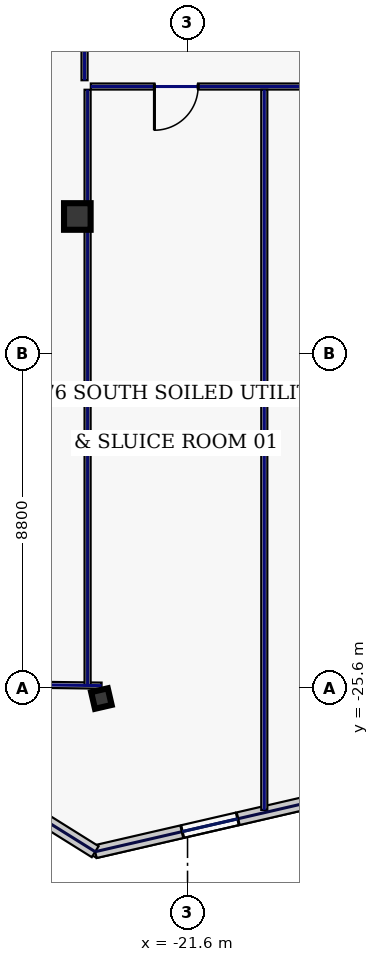
"""IFC4 building model, lengths in metres.
Left out: names, types, materials, properties, quantities, classifications, styles, units other than length and angle.
Written with IfcOpenShell. Run it as: python <this file> out.ifc"""

import sys

from ifc_helpers import new_model, si_unit, direction, frame, frame_2d, origin, origin_2d, place, context, subcontext, project, spatial, rectangle, hollow_rectangle, extrude, element, fill, save


model = new_model("IFC4")
c1 = context("Model", 3, precision=1e-05, world=origin(), true_north=direction((0.0, 1.0)))
c2 = subcontext(c1, "Body", "Model", "MODEL_VIEW")
j1 = project(units=[si_unit("LENGTHUNIT", "METRE"), si_unit("PLANEANGLEUNIT", "RADIAN")], contexts=[c1])
p1 = place(None, origin())
s1 = spatial("IfcSite", under=j1, at=p1, CompositionType="ELEMENT")
p2 = place(p1, origin())
s2 = spatial("IfcBuilding", under=s1, at=p2, CompositionType="ELEMENT")
p3 = place(p2, frame((0.0, 0.0, 325.0)))
s3 = spatial("IfcBuildingStorey", under=s2, at=p3, CompositionType="ELEMENT", Elevation=325.0)
p4 = place(p3, frame((-24.5, -13.2, 0.0), z_axis=(0.0, 0.0, 1.0), x_axis=(1.0, 0.0, 0.0)))
e1 = element("IfcColumn", 1, at=p4, inside=s3, PredefinedType="COLUMN", context=c2, shape_type="SweptSolid", body=[
    extrude(hollow_rectangle(XDim=0.7, YDim=0.7, WallThickness=0.032, at=origin_2d()), origin(), (0.0, 0.0, 1.0), 3.74),
])
p5 = place(p3, frame((-23.867, -25.886, 0.0), z_axis=(0.0, 0.0, 1.0), x_axis=(0.974370064785, 0.224951054344, 0.0)))
e2 = element("IfcColumn", 2, at=p5, inside=s3, PredefinedType="COLUMN", context=c2, shape_type="SweptSolid", body=[
    extrude(hollow_rectangle(XDim=0.45, YDim=0.45, WallThickness=0.022, at=origin_2d()), origin(), (0.0, 0.0, 1.0), 3.74),
])
p6 = place(p3, frame((-24.03, -29.916, 0.0), z_axis=(0.0, 0.0, 1.0), x_axis=(0.974370978061, 0.224947098473, 0.0)))
e3 = element("IfcWall", 3, at=p6, inside=s3, PredefinedType="STANDARD", context=c2, shape_type="SweptSolid", body=[
    extrude(rectangle(XDim=17.506, YDim=0.34, at=frame_2d((8.753, 0.0))), origin(), (0.0, 0.0, 1.0), 3.74),
])
p7 = place(p6, frame((2.35, 0.0, 0.9)))
e4 = element("IfcOpeningElement", 4, at=p7, cuts=e3, PredefinedType="OPENING", context=c2, shape_type="SweptSolid", body=[
    extrude(rectangle(XDim=1.5, YDim=2.0, at=frame_2d((0.75, 1.0))), frame((0.0, 0.18, 0.0), z_axis=(0.0, -1.0, 0.0), x_axis=(1.0, 0.0, 0.0)), (0.0, 0.0, 1.0), 0.36),
])
p8 = place(p6, frame((5.817, 0.0, 0.9)))
e5 = element("IfcOpeningElement", 5, at=p8, cuts=e3, PredefinedType="OPENING", context=c2, shape_type="SweptSolid", body=[
    extrude(rectangle(XDim=1.5, YDim=2.0, at=frame_2d((0.75, 1.0))), frame((0.0, 0.18, 0.0), z_axis=(0.0, -1.0, 0.0), x_axis=(1.0, 0.0, 0.0)), (0.0, 0.0, 1.0), 0.36),
])
p9 = place(p6, frame((9.886, 0.0, 0.9)))
e6 = element("IfcOpeningElement", 6, at=p9, cuts=e3, PredefinedType="OPENING", context=c2, shape_type="SweptSolid", body=[
    extrude(rectangle(XDim=1.5, YDim=2.0, at=frame_2d((0.75, 1.0))), frame((0.0, 0.18, 0.0), z_axis=(0.0, -1.0, 0.0), x_axis=(1.0, 0.0, 0.0)), (0.0, 0.0, 1.0), 0.36),
])
p10 = place(p6, frame((13.353, 0.0, 0.9)))
e7 = element("IfcOpeningElement", 7, at=p10, cuts=e3, PredefinedType="OPENING", context=c2, shape_type="SweptSolid", body=[
    extrude(rectangle(XDim=1.5, YDim=2.0, at=frame_2d((0.75, 1.0))), frame((0.0, 0.18, 0.0), z_axis=(0.0, -1.0, 0.0), x_axis=(1.0, 0.0, 0.0)), (0.0, 0.0, 1.0), 0.36),
])
p11 = place(p3, frame((-29.343, -26.596, 0.0), z_axis=(0.0, 0.0, 1.0), x_axis=(0.848037708252, -0.529935887993, 0.0)))
e8 = element("IfcWall", 8, at=p11, inside=s3, PredefinedType="STANDARD", context=c2, shape_type="SweptSolid", body=[
    extrude(rectangle(XDim=6.265, YDim=0.34, at=frame_2d((3.133, 0.0))), origin(), (0.0, 0.0, 1.0), 3.74),
])
p12 = place(p3, frame((-28.994, -25.479, 0.0), z_axis=(0.0, 0.0, 1.0), x_axis=(0.999915052546, -0.01303409726, 0.0)))
e9 = element("IfcWall", 9, at=p12, inside=s3, PredefinedType="PARTITIONING", context=c2, shape_type="SweptSolid", body=[
    extrude(rectangle(XDim=5.132, YDim=0.16, at=frame_2d((2.566, 0.0))), origin(), (0.0, 0.0, 1.0), 3.74),
])
p13 = place(p3, frame((-24.31, -9.615, 0.0), z_axis=(0.0, 0.0, 1.0), x_axis=(0.0, 1.0, 0.0)))
e10 = element("IfcWall", 10, at=p13, inside=s3, PredefinedType="PARTITIONING", context=c2, shape_type="SweptSolid", body=[
    extrude(rectangle(XDim=19.28, YDim=0.16, at=frame_2d((9.64, 0.0))), origin(), (0.0, 0.0, 1.0), 3.74),
])
p14 = place(p13, frame((1.969, 0.0, 0.0)))
e11 = element("IfcOpeningElement", 11, at=p14, cuts=e10, PredefinedType="OPENING", context=c2, shape_type="SweptSolid", body=[
    extrude(rectangle(XDim=0.95, YDim=2.2, at=frame_2d((0.475, 1.1))), frame((0.0, 0.09, 0.0), z_axis=(0.0, -1.0, 0.0), x_axis=(1.0, 0.0, 0.0)), (0.0, 0.0, 1.0), 0.18),
])
p15 = place(p13, frame((6.625, 0.0, 0.0)))
e12 = element("IfcOpeningElement", 12, at=p15, cuts=e10, PredefinedType="OPENING", context=c2, shape_type="SweptSolid", body=[
    extrude(rectangle(XDim=0.95, YDim=2.2, at=frame_2d((0.475, 1.1))), frame((0.0, 0.09, 0.0), z_axis=(0.0, -1.0, 0.0), x_axis=(1.0, 0.0, 0.0)), (0.0, 0.0, 1.0), 0.18),
])
p16 = place(p13, frame((11.825, 0.0, 0.0)))
e13 = element("IfcOpeningElement", 13, at=p16, cuts=e10, PredefinedType="OPENING", context=c2, shape_type="SweptSolid", body=[
    extrude(rectangle(XDim=0.95, YDim=2.2, at=frame_2d((0.475, 1.1))), frame((0.0, 0.09, 0.0), z_axis=(0.0, -1.0, 0.0), x_axis=(1.0, 0.0, 0.0)), (0.0, 0.0, 1.0), 0.18),
])
p17 = place(p13, frame((16.506, 0.0, 0.0)))
e14 = element("IfcOpeningElement", 14, at=p17, cuts=e10, PredefinedType="OPENING", context=c2, shape_type="SweptSolid", body=[
    extrude(rectangle(XDim=0.95, YDim=2.2, at=frame_2d((0.475, 1.1))), frame((0.0, 0.09, 0.0), z_axis=(0.0, -1.0, 0.0), x_axis=(1.0, 0.0, 0.0)), (0.0, 0.0, 1.0), 0.18),
])
p18 = place(p3, frame((12.535, -9.78, 0.0), z_axis=(0.0, 0.0, 1.0), x_axis=(-1.0, 0.0, 0.0)))
e15 = element("IfcWall", 15, at=p18, inside=s3, PredefinedType="PARTITIONING", context=c2, shape_type="SweptSolid", body=[
    extrude(rectangle(XDim=36.68, YDim=0.16, at=frame_2d((18.34, 0.0))), origin(), (0.0, 0.0, 1.0), 3.74),
])
p19 = place(p18, frame((33.856, 0.0, 0.0)))
e16 = element("IfcOpeningElement", 16, at=p19, cuts=e15, PredefinedType="OPENING", context=c2, shape_type="SweptSolid", body=[
    extrude(rectangle(XDim=1.15, YDim=2.2, at=frame_2d((0.575, 1.1))), frame((0.0, 0.09, 0.0), z_axis=(0.0, -1.0, 0.0), x_axis=(1.0, 0.0, 0.0)), (0.0, 0.0, 1.0), 0.18),
])
p20 = place(p18, frame((29.535, 0.0, 0.0)))
e17 = element("IfcOpeningElement", 17, at=p20, cuts=e15, PredefinedType="OPENING", context=c2, shape_type="SweptSolid", body=[
    extrude(rectangle(XDim=0.95, YDim=2.2, at=frame_2d((0.475, 1.1))), frame((0.0, 0.09, 0.0), z_axis=(0.0, -1.0, 0.0), x_axis=(1.0, 0.0, 0.0)), (0.0, 0.0, 1.0), 0.18),
])
p21 = place(p18, frame((23.555, 0.0, 0.0)))
e18 = element("IfcOpeningElement", 18, at=p21, cuts=e15, PredefinedType="OPENING", context=c2, shape_type="SweptSolid", body=[
    extrude(rectangle(XDim=1.05, YDim=2.2, at=frame_2d((0.525, 1.1))), frame((0.0, 0.09, 0.0), z_axis=(0.0, -1.0, 0.0), x_axis=(1.0, 0.0, 0.0)), (0.0, 0.0, 1.0), 0.18),
])
p22 = place(p18, frame((16.425, 0.0, 0.0)))
e19 = element("IfcOpeningElement", 19, at=p22, cuts=e15, PredefinedType="OPENING", context=c2, shape_type="SweptSolid", body=[
    extrude(rectangle(XDim=0.95, YDim=2.2, at=frame_2d((0.475, 1.1))), frame((0.0, 0.09, 0.0), z_axis=(0.0, -1.0, 0.0), x_axis=(1.0, 0.0, 0.0)), (0.0, 0.0, 1.0), 0.18),
])
p23 = place(p18, frame((9.385, 0.0, 0.0)))
e20 = element("IfcOpeningElement", 20, at=p23, cuts=e15, PredefinedType="OPENING", context=c2, shape_type="SweptSolid", body=[
    extrude(rectangle(XDim=0.95, YDim=2.2, at=frame_2d((0.475, 1.1))), frame((0.0, 0.09, 0.0), z_axis=(0.0, -1.0, 0.0), x_axis=(1.0, 0.0, 0.0)), (0.0, 0.0, 1.0), 0.18),
])
p24 = place(p18, frame((2.624, 0.0, 0.0)))
e21 = element("IfcOpeningElement", 21, at=p24, cuts=e15, PredefinedType="OPENING", context=c2, shape_type="SweptSolid", body=[
    extrude(rectangle(XDim=1.3, YDim=2.2, at=frame_2d((0.65, 1.1))), frame((0.0, 0.09, 0.0), z_axis=(0.0, -1.0, 0.0), x_axis=(1.0, 0.0, 0.0)), (0.0, 0.0, 1.0), 0.18),
])
p25 = place(p3, frame((-24.23, -25.536, 0.0), z_axis=(0.0, 0.0, 1.0), x_axis=(0.0, 1.0, 0.0)))
e22 = element("IfcWall", 22, at=p25, inside=s3, PredefinedType="PARTITIONING", context=c2, shape_type="SweptSolid", body=[
    extrude(rectangle(XDim=15.671, YDim=0.16, at=frame_2d((7.835, 0.0))), origin(), (0.0, 0.0, 1.0), 3.335),
])
p26 = place(p3, frame((-19.58, -28.817, 0.0), z_axis=(0.0, 0.0, 1.0), x_axis=(0.0, 1.0, 0.0)))
e23 = element("IfcWall", 23, at=p26, inside=s3, PredefinedType="PARTITIONING", context=c2, shape_type="SweptSolid", body=[
    extrude(rectangle(XDim=18.952, YDim=0.16, at=frame_2d((9.476, 0.0))), origin(), (0.0, 0.0, 1.0), 3.74),
])
p27 = place(p7, origin())
e24 = element("IfcWindow", 24, at=p27, inside=s3, PartitioningType="SINGLE_PANEL", PredefinedType="WINDOW", context=c2, shape_type="SweptSolid", body=[
    extrude(rectangle(XDim=1.5, YDim=2.0, at=frame_2d((0.75, 1.0))), frame((0.0, 0.03, 0.0), z_axis=(0.0, -1.0, 0.0), x_axis=(1.0, 0.0, 0.0)), (0.0, 0.0, 1.0), 0.06),
])
fill(e4, e24)
p28 = place(p19, origin())
e25 = element("IfcDoor", 25, at=p28, inside=s3, OperationType="SINGLE_SWING_RIGHT", PredefinedType="DOOR", context=c2, shape_type="SweptSolid", body=[
    extrude(rectangle(XDim=1.15, YDim=2.2, at=frame_2d((0.575, 1.1))), frame((0.0, 0.025, 0.0), z_axis=(0.0, -1.0, 0.0), x_axis=(1.0, 0.0, 0.0)), (0.0, 0.0, 1.0), 0.05),
])
fill(e16, e25)
save(model, sys.argv[1])
